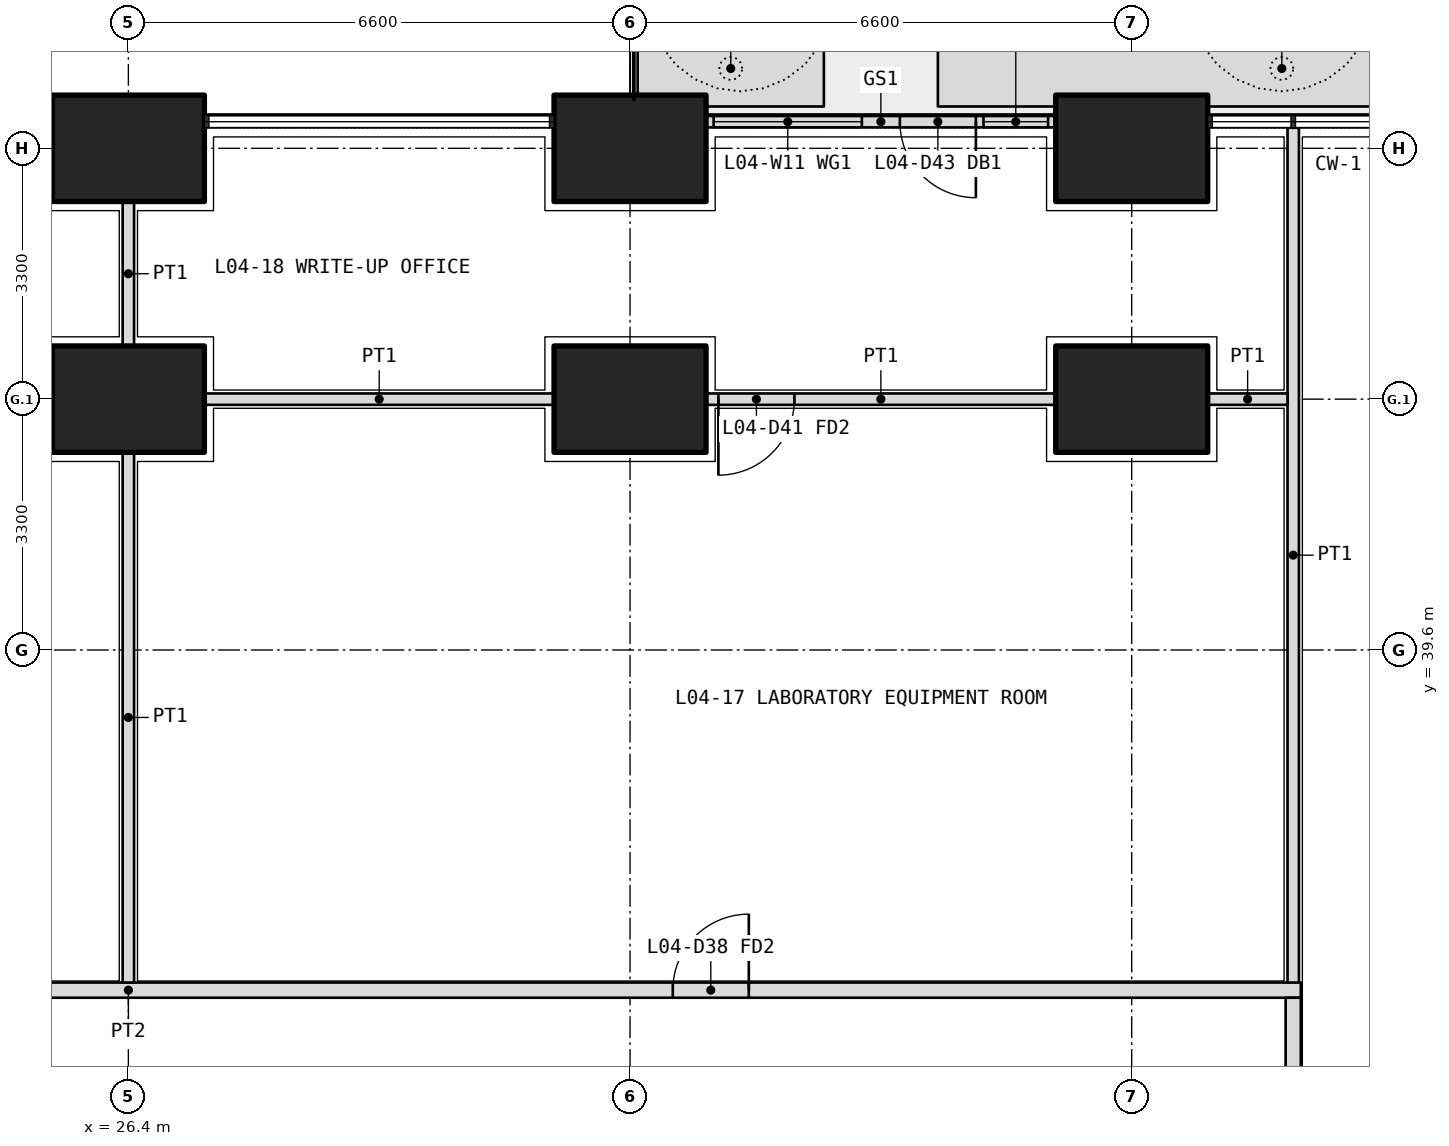
"""IFC4 building model, lengths in metres.
Left out: names, types, materials, properties, quantities, classifications, styles, units other than length and angle.
Written with IfcOpenShell. Run it as: python <this file> out.ifc"""

import sys

from ifc_helpers import new_model, si_unit, direction, frame, frame_2d, origin, origin_2d, place, context, subcontext, project, spatial, polyline, rectangle, outline, extrude, element, fill, save


model = new_model("IFC4")
c1 = context("Model", 3, precision=1e-05, world=origin(), true_north=direction((0.0, 1.0)))
c2 = subcontext(c1, "Body", "Model", "MODEL_VIEW")
j1 = project(units=[si_unit("LENGTHUNIT", "METRE"), si_unit("PLANEANGLEUNIT", "RADIAN")], contexts=[c1])
p1 = place(None, origin())
s1 = spatial("IfcSite", under=j1, at=p1, CompositionType="ELEMENT")
p2 = place(p1, origin())
s2 = spatial("IfcBuilding", under=s1, at=p2, CompositionType="ELEMENT")
p3 = place(p2, frame((0.0, 0.0, 21.3)))
s3 = spatial("IfcBuildingStorey", under=s2, at=p3, CompositionType="ELEMENT", Elevation=21.3)
for number, where, z_axis, x_axis in (
    (1, (26.4, 46.2, 0.0), (0.0, 0.0, 1.0), (1.0, 0.0, 0.0)),
    (2, (33.0, 46.2, 0.0), (0.0, 0.0, 1.0), (1.0, 0.0, 0.0)),
    (3, (39.6, 46.2, 0.0), (0.0, 0.0, 1.0), (1.0, 0.0, 0.0)),
    (4, (26.4, 42.9, 0.0), (0.0, 0.0, 1.0), (1.0, 0.0, 0.0)),
    (5, (33.0, 42.9, 0.0), (0.0, 0.0, 1.0), (1.0, 0.0, 0.0)),
    (6, (39.6, 42.9, 0.0), (0.0, 0.0, 1.0), (1.0, 0.0, 0.0)),
):
    element("IfcColumn", number, at=place(p3, frame(where, z_axis=z_axis, x_axis=x_axis)), inside=s3, PredefinedType="COLUMN", context=c2, shape_type="SweptSolid", body=[
        extrude(rectangle(XDim=2.0, YDim=1.4, at=origin_2d()), origin(), (0.0, 0.0, 1.0), 4.2),
    ])
p4 = place(p3, origin())
e7 = element("IfcWall", 7, at=p4, inside=s3, PredefinedType="USERDEFINED", context=c2, shape_type="SweptSolid", body=[
    extrude(outline(polyline([(33.1, 46.75), (35.55, 46.75), (35.55, 47.75), (33.1, 47.75), (33.1, 46.75)]), holes=[polyline([(33.25, 46.9), (35.4, 46.9), (35.4, 47.6), (33.25, 47.6), (33.25, 46.9)])]), origin(), (0.0, 0.0, 1.0), 1.05),
])
p5 = place(p3, origin())
e8 = element("IfcWall", 8, at=p5, inside=s3, PredefinedType="USERDEFINED", context=c2, shape_type="SweptSolid", body=[
    extrude(outline(polyline([(37.05, 46.75), (46.1, 46.75), (46.1, 47.75), (37.05, 47.75), (37.05, 46.75)]), holes=[polyline([(37.2, 46.9), (45.95, 46.9), (45.95, 47.6), (37.2, 47.6), (37.2, 46.9)])]), origin(), (0.0, 0.0, 1.0), 1.05),
])
p6 = place(p3, frame((38.6, 46.55, 0.0), z_axis=(0.0, 0.0, 1.0), x_axis=(-1.0, 0.0, 0.0)))
e9 = element("IfcWall", 9, at=p6, inside=s3, PredefinedType="SOLIDWALL", context=c2, shape_type="SweptSolid", body=[
    extrude(rectangle(XDim=4.6, YDim=0.15, at=frame_2d((2.3, 0.0))), origin(), (0.0, 0.0, 1.0), 2.7),
])
p7 = place(p6, frame((1.05, 0.0, 0.0)))
e10 = element("IfcOpeningElement", 10, at=p7, cuts=e9, PredefinedType="OPENING", context=c2, shape_type="SweptSolid", body=[
    extrude(rectangle(XDim=1.0, YDim=2.4, at=frame_2d((0.5, 1.2))), frame((0.0, 0.085, 0.0), z_axis=(0.0, -1.0, 0.0), x_axis=(1.0, 0.0, 0.0)), (0.0, 0.0, 1.0), 0.17),
])
p8 = place(p6, frame((0.1, 0.0, 0.1)))
e11 = element("IfcOpeningElement", 11, at=p8, cuts=e9, PredefinedType="OPENING", context=c2, shape_type="SweptSolid", body=[
    extrude(rectangle(XDim=0.85, YDim=2.3, at=frame_2d((0.425, 1.15))), frame((0.0, 0.085, 0.0), z_axis=(0.0, -1.0, 0.0), x_axis=(1.0, 0.0, 0.0)), (0.0, 0.0, 1.0), 0.17),
])
p9 = place(p6, frame((2.55, 0.0, 0.1)))
e12 = element("IfcOpeningElement", 12, at=p9, cuts=e9, PredefinedType="OPENING", context=c2, shape_type="SweptSolid", body=[
    extrude(rectangle(XDim=1.95, YDim=2.3, at=frame_2d((0.975, 1.15))), frame((0.0, 0.085, 0.0), z_axis=(0.0, -1.0, 0.0), x_axis=(1.0, 0.0, 0.0)), (0.0, 0.0, 1.0), 0.17),
])
p10 = place(p3, frame((10.975, 35.125, 0.0), z_axis=(0.0, 0.0, 1.0), x_axis=(1.0, 0.0, 0.0)))
e13 = element("IfcWall", 13, at=p10, inside=s3, PredefinedType="PARTITIONING", context=c2, shape_type="SweptSolid", body=[
    extrude(rectangle(XDim=30.85, YDim=0.2, at=frame_2d((15.425, 0.0))), origin(), (0.0, 0.0, 1.0), 2.85),
])
p11 = place(p10, frame((7.262, 0.0, 0.0)))
e14 = element("IfcOpeningElement", 14, at=p11, cuts=e13, PredefinedType="OPENING", context=c2, shape_type="SweptSolid", body=[
    extrude(rectangle(XDim=1.0, YDim=2.1, at=frame_2d((0.5, 1.05))), frame((0.0, 0.11, 0.0), z_axis=(0.0, -1.0, 0.0), x_axis=(1.0, 0.0, 0.0)), (0.0, 0.0, 1.0), 0.22),
])
p12 = place(p10, frame((22.587, 0.0, 0.0)))
e15 = element("IfcOpeningElement", 15, at=p12, cuts=e13, PredefinedType="OPENING", context=c2, shape_type="SweptSolid", body=[
    extrude(rectangle(XDim=1.0, YDim=2.1, at=frame_2d((0.5, 1.05))), frame((0.0, 0.11, 0.0), z_axis=(0.0, -1.0, 0.0), x_axis=(1.0, 0.0, 0.0)), (0.0, 0.0, 1.0), 0.22),
])
p13 = place(p3, frame((41.725, 11.175, 0.0), z_axis=(0.0, 0.0, 1.0), x_axis=(0.0, 1.0, 0.0)))
e16 = element("IfcWall", 16, at=p13, inside=s3, PredefinedType="PARTITIONING", context=c2, shape_type="SweptSolid", body=[
    extrude(rectangle(XDim=23.85, YDim=0.2, at=frame_2d((11.925, 0.0))), origin(), (0.0, 0.0, 1.0), 2.85),
])
p14 = place(p13, frame((3.762, 0.0, 0.0)))
e17 = element("IfcOpeningElement", 17, at=p14, cuts=e16, PredefinedType="OPENING", context=c2, shape_type="SweptSolid", body=[
    extrude(rectangle(XDim=1.0, YDim=2.1, at=frame_2d((0.5, 1.05))), frame((0.0, 0.11, 0.0), z_axis=(0.0, -1.0, 0.0), x_axis=(1.0, 0.0, 0.0)), (0.0, 0.0, 1.0), 0.22),
])
p15 = place(p13, frame((9.625, 0.0, 0.0)))
e18 = element("IfcOpeningElement", 18, at=p15, cuts=e16, PredefinedType="OPENING", context=c2, shape_type="SweptSolid", body=[
    extrude(rectangle(XDim=1.0, YDim=2.1, at=frame_2d((0.5, 1.05))), frame((0.0, 0.11, 0.0), z_axis=(0.0, -1.0, 0.0), x_axis=(1.0, 0.0, 0.0)), (0.0, 0.0, 1.0), 0.22),
])
p16 = place(p13, frame((12.975, 0.0, 0.0)))
e19 = element("IfcOpeningElement", 19, at=p16, cuts=e16, PredefinedType="OPENING", context=c2, shape_type="SweptSolid", body=[
    extrude(rectangle(XDim=0.9, YDim=2.1, at=frame_2d((0.45, 1.05))), frame((0.0, 0.11, 0.0), z_axis=(0.0, -1.0, 0.0), x_axis=(1.0, 0.0, 0.0)), (0.0, 0.0, 1.0), 0.22),
])
p17 = place(p13, frame((18.988, 0.0, 0.0)))
e20 = element("IfcOpeningElement", 20, at=p17, cuts=e16, PredefinedType="OPENING", context=c2, shape_type="SweptSolid", body=[
    extrude(rectangle(XDim=1.2, YDim=2.1, at=frame_2d((0.6, 1.05))), frame((0.0, 0.11, 0.0), z_axis=(0.0, -1.0, 0.0), x_axis=(1.0, 0.0, 0.0)), (0.0, 0.0, 1.0), 0.22),
])
p18 = place(p3, frame((41.725, 46.47, 0.0), z_axis=(0.0, 0.0, 1.0), x_axis=(0.0, -1.0, 0.0)))
e21 = element("IfcWall", 21, at=p18, inside=s3, PredefinedType="PARTITIONING", context=c2, shape_type="SweptSolid", body=[
    extrude(rectangle(XDim=11.245, YDim=0.15, at=frame_2d((5.623, 0.0))), origin(), (0.0, 0.0, 1.0), 2.7),
])
p19 = place(p3, frame((41.65, 42.9, 0.0), z_axis=(0.0, 0.0, 1.0), x_axis=(-1.0, 0.0, 0.0)))
e22 = element("IfcWall", 22, at=p19, inside=s3, PredefinedType="PARTITIONING", context=c2, shape_type="SweptSolid", body=[
    extrude(rectangle(XDim=1.05, YDim=0.15, at=frame_2d((0.525, 0.0))), origin(), (0.0, 0.0, 1.0), 3.9),
])
p20 = place(p3, frame((38.6, 42.9, 0.0), z_axis=(0.0, 0.0, 1.0), x_axis=(-1.0, 0.0, 0.0)))
e23 = element("IfcWall", 23, at=p20, inside=s3, PredefinedType="PARTITIONING", context=c2, shape_type="SweptSolid", body=[
    extrude(rectangle(XDim=4.6, YDim=0.15, at=frame_2d((2.3, 0.0))), origin(), (0.0, 0.0, 1.0), 3.9),
])
p21 = place(p20, frame((3.438, 0.0, 0.0)))
e24 = element("IfcOpeningElement", 24, at=p21, cuts=e23, PredefinedType="OPENING", context=c2, shape_type="SweptSolid", body=[
    extrude(rectangle(XDim=1.0, YDim=2.1, at=frame_2d((0.5, 1.05))), frame((0.0, 0.085, 0.0), z_axis=(0.0, -1.0, 0.0), x_axis=(1.0, 0.0, 0.0)), (0.0, 0.0, 1.0), 0.17),
])
p22 = place(p3, frame((32.0, 42.9, 0.0), z_axis=(0.0, 0.0, 1.0), x_axis=(-1.0, 0.0, 0.0)))
e25 = element("IfcWall", 25, at=p22, inside=s3, PredefinedType="PARTITIONING", context=c2, shape_type="SweptSolid", body=[
    extrude(rectangle(XDim=4.6, YDim=0.15, at=frame_2d((2.3, 0.0))), origin(), (0.0, 0.0, 1.0), 3.9),
])
p23 = place(p3, frame((25.4, 42.9, 0.0), z_axis=(0.0, 0.0, 1.0), x_axis=(-1.0, 0.0, 0.0)))
e26 = element("IfcWall", 26, at=p23, inside=s3, PredefinedType="PARTITIONING", context=c2, shape_type="SweptSolid", body=[
    extrude(rectangle(XDim=4.6, YDim=0.15, at=frame_2d((2.3, 0.0))), origin(), (0.0, 0.0, 1.0), 3.9),
])
p24 = place(p3, frame((26.4, 45.5, 0.0), z_axis=(0.0, 0.0, 1.0), x_axis=(0.0, -1.0, 0.0)))
e27 = element("IfcWall", 27, at=p24, inside=s3, PredefinedType="PARTITIONING", context=c2, shape_type="SweptSolid", body=[
    extrude(rectangle(XDim=1.9, YDim=0.15, at=frame_2d((0.95, 0.0))), origin(), (0.0, 0.0, 1.0), 2.85),
])
p25 = place(p3, frame((26.4, 42.2, 0.0), z_axis=(0.0, 0.0, 1.0), x_axis=(0.0, -1.0, 0.0)))
e28 = element("IfcWall", 28, at=p25, inside=s3, PredefinedType="PARTITIONING", context=c2, shape_type="SweptSolid", body=[
    extrude(rectangle(XDim=6.975, YDim=0.15, at=frame_2d((3.487, 0.0))), origin(), (0.0, 0.0, 1.0), 2.85),
])
p26 = place(p7, origin())
e29 = element("IfcDoor", 29, at=p26, inside=s3, OperationType="SINGLE_SWING_LEFT", PredefinedType="DOOR", context=c2, shape_type="SweptSolid", body=[
    extrude(rectangle(XDim=1.0, YDim=2.4, at=frame_2d((0.5, 1.2))), frame((0.0, 0.025, 0.0), z_axis=(0.0, -1.0, 0.0), x_axis=(1.0, 0.0, 0.0)), (0.0, 0.0, 1.0), 0.05),
])
fill(e10, e29)
p27 = place(p8, origin())
e30 = element("IfcWindow", 30, at=p27, inside=s3, PartitioningType="SINGLE_PANEL", PredefinedType="WINDOW", context=c2, shape_type="SweptSolid", body=[
    extrude(rectangle(XDim=0.85, YDim=2.3, at=frame_2d((0.425, 1.15))), frame((0.0, 0.03, 0.0), z_axis=(0.0, -1.0, 0.0), x_axis=(1.0, 0.0, 0.0)), (0.0, 0.0, 1.0), 0.06),
])
fill(e11, e30)
p28 = place(p9, origin())
e31 = element("IfcWindow", 31, at=p28, inside=s3, PartitioningType="SINGLE_PANEL", PredefinedType="WINDOW", context=c2, shape_type="SweptSolid", body=[
    extrude(rectangle(XDim=1.95, YDim=2.3, at=frame_2d((0.975, 1.15))), frame((0.0, 0.03, 0.0), z_axis=(0.0, -1.0, 0.0), x_axis=(1.0, 0.0, 0.0)), (0.0, 0.0, 1.0), 0.06),
])
fill(e12, e31)
p29 = place(p12, origin())
e32 = element("IfcDoor", 32, at=p29, inside=s3, OperationType="SINGLE_SWING_RIGHT", PredefinedType="DOOR", context=c2, shape_type="SweptSolid", body=[
    extrude(rectangle(XDim=1.0, YDim=2.1, at=frame_2d((0.5, 1.05))), frame((0.0, 0.025, 0.0), z_axis=(0.0, -1.0, 0.0), x_axis=(1.0, 0.0, 0.0)), (0.0, 0.0, 1.0), 0.05),
])
fill(e15, e32)
p30 = place(p21, origin())
e33 = element("IfcDoor", 33, at=p30, inside=s3, OperationType="SINGLE_SWING_RIGHT", PredefinedType="DOOR", context=c2, shape_type="SweptSolid", body=[
    extrude(rectangle(XDim=1.0, YDim=2.1, at=frame_2d((0.5, 1.05))), frame((0.0, 0.025, 0.0), z_axis=(0.0, -1.0, 0.0), x_axis=(1.0, 0.0, 0.0)), (0.0, 0.0, 1.0), 0.05),
])
fill(e24, e33)
save(model, sys.argv[1])
